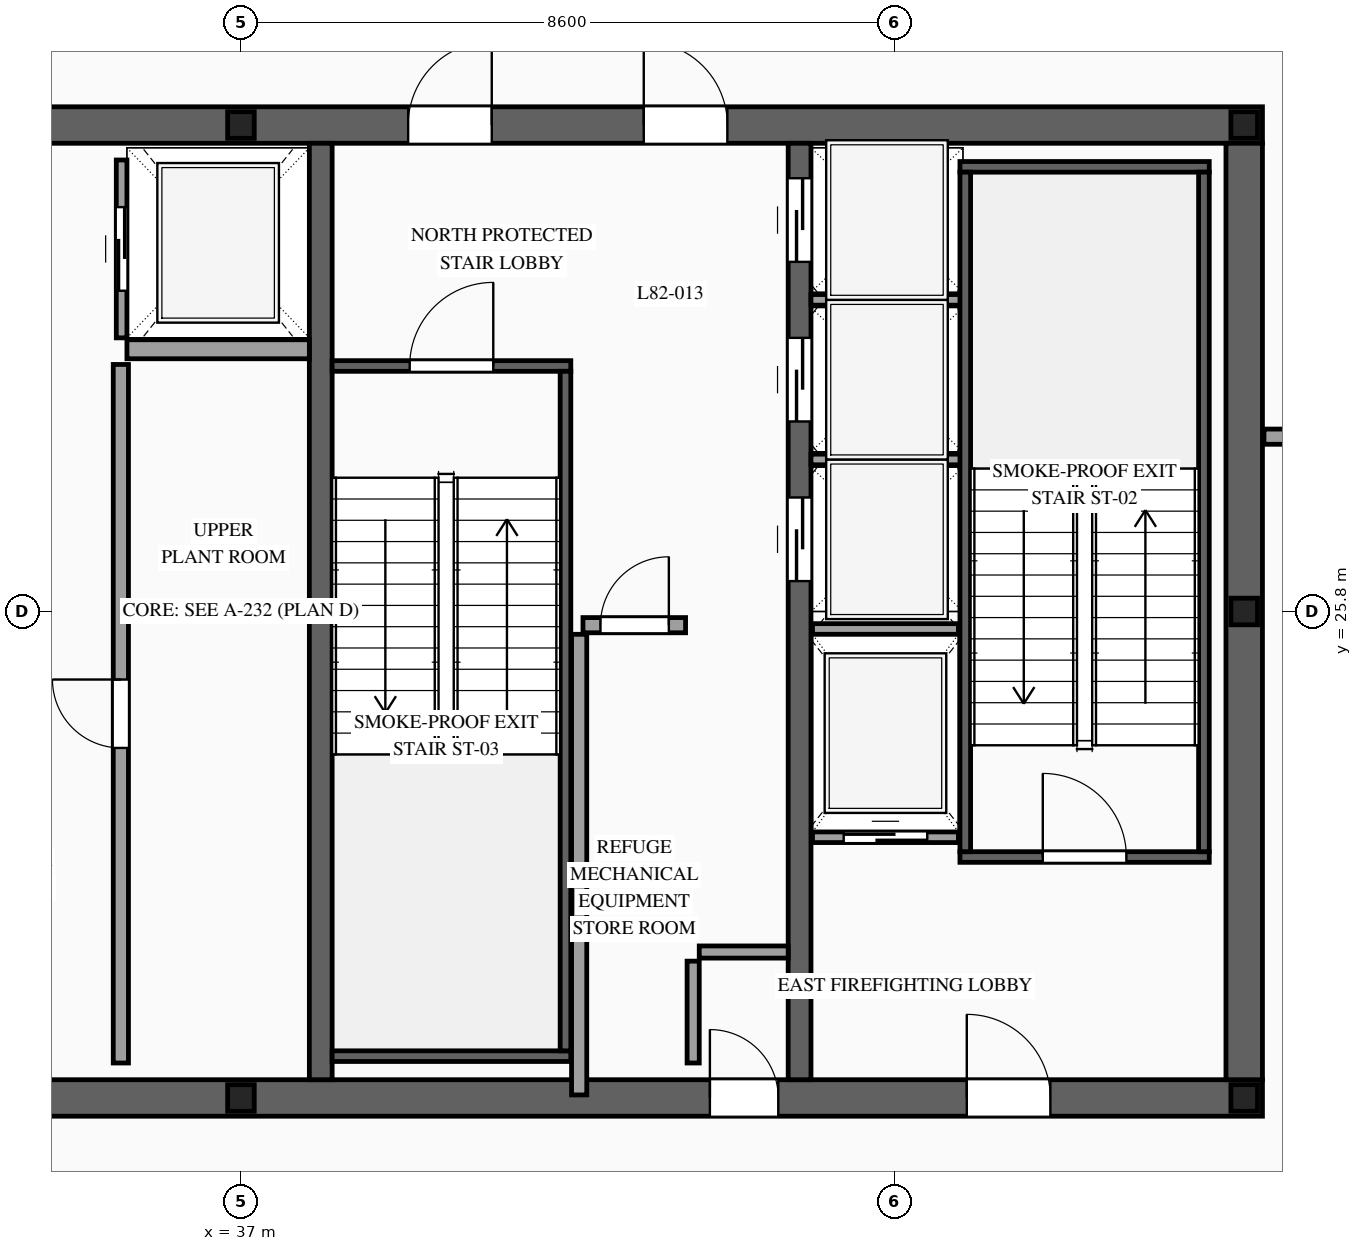
"""IFC4 building model, lengths in metres.
Left out: names, types, materials, properties, quantities, classifications, styles, units other than length and angle.
Written with IfcOpenShell. Run it as: python <this file> out.ifc"""

import sys

from ifc_helpers import new_model, si_unit, direction, frame, frame_2d, origin, origin_2d, place, context, subcontext, project, spatial, rectangle, i_section, extrude, source, transform, mapped, element, fill, save


model = new_model("IFC4")
c1 = context("Model", 3, precision=1e-05, world=origin(), true_north=direction((0.0, 1.0)))
c2 = subcontext(c1, "Body", "Model", "MODEL_VIEW")
j1 = project(units=[si_unit("LENGTHUNIT", "METRE"), si_unit("PLANEANGLEUNIT", "RADIAN")], contexts=[c1])
p1 = place(None, origin())
s1 = spatial("IfcSite", under=j1, at=p1, CompositionType="ELEMENT")
p2 = place(p1, origin())
s2 = spatial("IfcBuilding", under=s1, at=p2, CompositionType="ELEMENT")
p3 = place(p2, frame((0.0, 0.0, 306.6)))
s3 = spatial("IfcBuildingStorey", under=s2, at=p3, CompositionType="ELEMENT", Elevation=306.6)
p4 = place(p3, frame((23.56, 19.4, 0.0), z_axis=(0.0, 0.0, 1.0), x_axis=(1.0, 0.0, 0.0)))
e1 = element("IfcWall", 1, at=p4, inside=s3, PredefinedType="SHEAR", context=c2, shape_type="SweptSolid", body=[
    extrude(rectangle(XDim=26.88, YDim=0.48, at=frame_2d((13.44, 0.0))), origin(), (0.0, 0.0, 1.0), 4.6),
])
p5 = place(p4, frame((1.89, 0.0, 0.0)))
e2 = element("IfcOpeningElement", 2, at=p5, cuts=e1, PredefinedType="OPENING", context=c2, shape_type="SweptSolid", body=[
    extrude(rectangle(XDim=1.1, YDim=2.2, at=frame_2d((0.55, 1.1))), frame((0.0, 0.255, 0.0), z_axis=(0.0, -1.0, 0.0), x_axis=(1.0, 0.0, 0.0)), (0.0, 0.0, 1.0), 0.51),
])
p6 = place(p4, frame((9.79, 0.0, 0.0)))
e3 = element("IfcOpeningElement", 3, at=p6, cuts=e1, PredefinedType="OPENING", context=c2, shape_type="SweptSolid", body=[
    extrude(rectangle(XDim=1.1, YDim=2.2, at=frame_2d((0.55, 1.1))), frame((0.0, 0.255, 0.0), z_axis=(0.0, -1.0, 0.0), x_axis=(1.0, 0.0, 0.0)), (0.0, 0.0, 1.0), 0.51),
])
p7 = place(p4, frame((22.99, 0.0, 0.0)))
e4 = element("IfcOpeningElement", 4, at=p7, cuts=e1, PredefinedType="OPENING", context=c2, shape_type="SweptSolid", body=[
    extrude(rectangle(XDim=1.1, YDim=2.2, at=frame_2d((0.55, 1.1))), frame((0.0, 0.255, 0.0), z_axis=(0.0, -1.0, 0.0), x_axis=(1.0, 0.0, 0.0)), (0.0, 0.0, 1.0), 0.51),
])
p8 = place(p4, frame((19.61, 0.0, 0.0)))
e5 = element("IfcOpeningElement", 5, at=p8, cuts=e1, PredefinedType="OPENING", context=c2, shape_type="SweptSolid", body=[
    extrude(rectangle(XDim=0.9, YDim=2.15, at=frame_2d((0.45, 1.075))), frame((0.0, 0.255, 0.0), z_axis=(0.0, -1.0, 0.0), x_axis=(1.0, 0.0, 0.0)), (0.0, 0.0, 1.0), 0.51),
])
p9 = place(p3, frame((23.56, 32.2, 0.0), z_axis=(0.0, 0.0, 1.0), x_axis=(1.0, 0.0, 0.0)))
e6 = element("IfcWall", 6, at=p9, inside=s3, PredefinedType="SHEAR", context=c2, shape_type="SweptSolid", body=[
    extrude(rectangle(XDim=26.88, YDim=0.48, at=frame_2d((13.44, 0.0))), origin(), (0.0, 0.0, 1.0), 4.6),
])
p10 = place(p9, frame((4.51, 0.0, 0.0)))
e7 = element("IfcOpeningElement", 7, at=p10, cuts=e6, PredefinedType="OPENING", context=c2, shape_type="SweptSolid", body=[
    extrude(rectangle(XDim=0.9, YDim=2.15, at=frame_2d((0.45, 1.075))), frame((0.0, 0.255, 0.0), z_axis=(0.0, -1.0, 0.0), x_axis=(1.0, 0.0, 0.0)), (0.0, 0.0, 1.0), 0.51),
])
p11 = place(p9, frame((9.79, 0.0, 0.0)))
e8 = element("IfcOpeningElement", 8, at=p11, cuts=e6, PredefinedType="OPENING", context=c2, shape_type="SweptSolid", body=[
    extrude(rectangle(XDim=1.1, YDim=2.2, at=frame_2d((0.55, 1.1))), frame((0.0, 0.255, 0.0), z_axis=(0.0, -1.0, 0.0), x_axis=(1.0, 0.0, 0.0)), (0.0, 0.0, 1.0), 0.51),
])
p12 = place(p9, frame((15.64, 0.0, 0.0)))
e9 = element("IfcOpeningElement", 9, at=p12, cuts=e6, PredefinedType="OPENING", context=c2, shape_type="SweptSolid", body=[
    extrude(rectangle(XDim=1.1, YDim=2.2, at=frame_2d((0.55, 1.1))), frame((0.0, 0.255, 0.0), z_axis=(0.0, -1.0, 0.0), x_axis=(1.0, 0.0, 0.0)), (0.0, 0.0, 1.0), 0.51),
])
p13 = place(p9, frame((18.74, 0.0, 0.0)))
e10 = element("IfcOpeningElement", 10, at=p13, cuts=e6, PredefinedType="OPENING", context=c2, shape_type="SweptSolid", body=[
    extrude(rectangle(XDim=1.1, YDim=2.2, at=frame_2d((0.55, 1.1))), frame((0.0, 0.255, 0.0), z_axis=(0.0, -1.0, 0.0), x_axis=(1.0, 0.0, 0.0)), (0.0, 0.0, 1.0), 0.51),
])
m1 = source(origin(), c2, "Body", "SweptSolid", [
    extrude(rectangle(XDim=12.32, YDim=0.48, at=frame_2d((6.16, 0.0))), origin(), (0.0, 0.0, 1.0), 4.6),
])
p14 = place(p3, frame((50.2, 19.64, 0.0), z_axis=(0.0, 0.0, 1.0), x_axis=(0.0, 1.0, 0.0)))
e11 = element("IfcWall", 11, at=p14, inside=s3, PredefinedType="SHEAR", context=c2, shape_type="MappedRepresentation", body=[
    mapped(m1, transform((0.0, 0.0, 0.0), scale=1.0)),
])
m2 = source(origin(), c2, "Body", "SweptSolid", [
    extrude(rectangle(XDim=12.32, YDim=0.3, at=frame_2d((6.16, 0.0))), origin(), (0.0, 0.0, 1.0), 4.6),
])
p15 = place(p3, frame((38.05, 19.64, 0.0), z_axis=(0.0, 0.0, 1.0), x_axis=(0.0, 1.0, 0.0)))
e12 = element("IfcWall", 12, at=p15, inside=s3, PredefinedType="SOLIDWALL", context=c2, shape_type="MappedRepresentation", body=[
    mapped(m2, transform((0.0, 0.0, 0.0), scale=1.0)),
])
p16 = place(p3, frame((44.35, 19.64, 0.0), z_axis=(0.0, 0.0, 1.0), x_axis=(0.0, 1.0, 0.0)))
e13 = element("IfcWall", 13, at=p16, inside=s3, PredefinedType="SOLIDWALL", context=c2, shape_type="SweptSolid", body=[
    extrude(rectangle(XDim=12.32, YDim=0.3, at=frame_2d((6.16, 0.0))), origin(), (0.0, 0.0, 1.0), 4.6),
])
p17 = place(p16, frame((6.56, 0.0, 0.0)))
e14 = element("IfcOpeningElement", 14, at=p17, cuts=e13, PredefinedType="OPENING", context=c2, shape_type="SweptSolid", body=[
    extrude(rectangle(XDim=1.1, YDim=2.2, at=frame_2d((0.55, 1.1))), frame((0.0, 0.165, 0.0), z_axis=(0.0, -1.0, 0.0), x_axis=(1.0, 0.0, 0.0)), (0.0, 0.0, 1.0), 0.33),
])
p18 = place(p16, frame((8.66, 0.0, 0.0)))
e15 = element("IfcOpeningElement", 15, at=p18, cuts=e13, PredefinedType="OPENING", context=c2, shape_type="SweptSolid", body=[
    extrude(rectangle(XDim=1.1, YDim=2.2, at=frame_2d((0.55, 1.1))), frame((0.0, 0.165, 0.0), z_axis=(0.0, -1.0, 0.0), x_axis=(1.0, 0.0, 0.0)), (0.0, 0.0, 1.0), 0.33),
])
p19 = place(p16, frame((10.76, 0.0, 0.0)))
e16 = element("IfcOpeningElement", 16, at=p19, cuts=e13, PredefinedType="OPENING", context=c2, shape_type="SweptSolid", body=[
    extrude(rectangle(XDim=1.1, YDim=2.2, at=frame_2d((0.55, 1.1))), frame((0.0, 0.165, 0.0), z_axis=(0.0, -1.0, 0.0), x_axis=(1.0, 0.0, 0.0)), (0.0, 0.0, 1.0), 0.33),
])
m3 = source(origin(), c2, "Body", "SweptSolid", [
    extrude(i_section(OverallWidth=0.35, OverallDepth=0.35, WebThickness=0.012, FlangeThickness=0.019, at=origin_2d()), origin(), (0.0, 0.0, 1.0), 4.6),
])
for number, where, z_axis, x_axis in (
    (17, (37.0, 19.4, 0.0), (0.0, 0.0, 1.0), (1.0, 0.0, 0.0)),
    (18, (50.2, 19.4, 0.0), (0.0, 0.0, 1.0), (1.0, 0.0, 0.0)),
    (19, (50.2, 25.8, 0.0), (0.0, 0.0, 1.0), (1.0, 0.0, 0.0)),
    (20, (37.0, 32.2, 0.0), (0.0, 0.0, 1.0), (1.0, 0.0, 0.0)),
    (21, (50.2, 32.2, 0.0), (0.0, 0.0, 1.0), (1.0, 0.0, 0.0)),
):
    element("IfcColumn", number, at=place(p3, frame(where, z_axis=z_axis, x_axis=x_axis)), inside=s3, PredefinedType="COLUMN", context=c2, shape_type="MappedRepresentation", body=[
        mapped(m3, transform((0.0, 0.0, 0.0), scale=1.0)),
    ])
p20 = place(p3, frame((44.52, 22.83, 0.0), z_axis=(0.0, 0.0, 1.0), x_axis=(1.0, 0.0, 0.0)))
e22 = element("IfcWall", 22, at=p20, inside=s3, PredefinedType="SOLIDWALL", context=c2, shape_type="SweptSolid", body=[
    extrude(rectangle(XDim=1.92, YDim=0.14, at=frame_2d((0.96, 0.0))), origin(), (0.0, 0.0, 1.0), 4.38),
])
p21 = place(p20, frame((0.41, 0.0, 0.0)))
e23 = element("IfcOpeningElement", 23, at=p21, cuts=e22, PredefinedType="OPENING", context=c2, shape_type="SweptSolid", body=[
    extrude(rectangle(XDim=1.1, YDim=2.2, at=frame_2d((0.55, 1.1))), frame((0.0, 0.085, 0.0), z_axis=(0.0, -1.0, 0.0), x_axis=(1.0, 0.0, 0.0)), (0.0, 0.0, 1.0), 0.17),
])
m4 = source(origin(), c2, "Body", "SweptSolid", [
    extrude(rectangle(XDim=1.92, YDim=0.14, at=frame_2d((0.96, 0.0))), origin(), (0.0, 0.0, 1.0), 4.38),
])
p22 = place(p3, frame((44.52, 25.57, 0.0), z_axis=(0.0, 0.0, 1.0), x_axis=(1.0, 0.0, 0.0)))
e24 = element("IfcWall", 24, at=p22, inside=s3, PredefinedType="SOLIDWALL", context=c2, shape_type="MappedRepresentation", body=[
    mapped(m4, transform((0.0, 0.0, 0.0), scale=1.0)),
])
p23 = place(p3, frame((35.43, 29.4, 0.0), z_axis=(0.0, 0.0, 1.0), x_axis=(0.0, 1.0, 0.0)))
e25 = element("IfcWall", 25, at=p23, inside=s3, PredefinedType="SOLIDWALL", context=c2, shape_type="SweptSolid", body=[
    extrude(rectangle(XDim=2.34, YDim=0.14, at=frame_2d((1.17, 0.0))), origin(), (0.0, 0.0, 1.0), 4.38),
])
p24 = place(p23, frame((0.62, 0.0, 0.0)))
e26 = element("IfcOpeningElement", 26, at=p24, cuts=e25, PredefinedType="OPENING", context=c2, shape_type="SweptSolid", body=[
    extrude(rectangle(XDim=1.1, YDim=2.2, at=frame_2d((0.55, 1.1))), frame((0.0, 0.085, 0.0), z_axis=(0.0, -1.0, 0.0), x_axis=(1.0, 0.0, 0.0)), (0.0, 0.0, 1.0), 0.17),
])
m5 = source(origin(), c2, "Body", "SweptSolid", [
    extrude(rectangle(XDim=2.4, YDim=0.25, at=frame_2d((1.2, 0.0))), origin(), (0.0, 0.0, 1.0), 4.38),
])
p25 = place(p3, frame((35.5, 29.25, 0.0), z_axis=(0.0, 0.0, 1.0), x_axis=(1.0, 0.0, 0.0)))
e27 = element("IfcWall", 27, at=p25, inside=s3, PredefinedType="SOLIDWALL", context=c2, shape_type="MappedRepresentation", body=[
    mapped(m5, transform((0.0, 0.0, 0.0), scale=1.0)),
])
m6 = source(origin(), c2, "Body", "SweptSolid", [
    extrude(rectangle(XDim=2.0, YDim=0.14, at=frame_2d((1.0, 0.0))), origin(), (0.0, 0.0, 1.0), 4.38),
])
for number, where, z_axis, x_axis in (
    (28, (44.5, 27.8, 0.0), (0.0, 0.0, 1.0), (1.0, 0.0, 0.0)),
    (29, (44.5, 29.9, 0.0), (0.0, 0.0, 1.0), (1.0, 0.0, 0.0)),
):
    element("IfcWall", number, at=place(p3, frame(where, z_axis=z_axis, x_axis=x_axis)), inside=s3, PredefinedType="SOLIDWALL", context=c2, shape_type="MappedRepresentation", body=[
        mapped(m6, transform((0.0, 0.0, 0.0), scale=1.0)),
    ])
p26 = place(p3, frame((46.46, 22.57, 0.0), z_axis=(0.0, 0.0, 1.0), x_axis=(1.0, 0.0, 0.0)))
e30 = element("IfcWall", 30, at=p26, inside=s3, PredefinedType="SOLIDWALL", context=c2, shape_type="SweptSolid", body=[
    extrude(rectangle(XDim=3.28, YDim=0.14, at=frame_2d((1.64, 0.0))), origin(), (0.0, 0.0, 1.0), 4.38),
])
p27 = place(p26, frame((1.09, 0.0, 0.0)))
e31 = element("IfcOpeningElement", 31, at=p27, cuts=e30, PredefinedType="OPENING", context=c2, shape_type="SweptSolid", body=[
    extrude(rectangle(XDim=1.1, YDim=2.2, at=frame_2d((0.55, 1.1))), frame((0.0, 0.085, 0.0), z_axis=(0.0, -1.0, 0.0), x_axis=(1.0, 0.0, 0.0)), (0.0, 0.0, 1.0), 0.17),
])
m7 = source(origin(), c2, "Body", "SweptSolid", [
    extrude(rectangle(XDim=3.28, YDim=0.14, at=frame_2d((1.64, 0.0))), origin(), (0.0, 0.0, 1.0), 4.38),
])
p28 = place(p3, frame((46.46, 31.65, 0.0), z_axis=(0.0, 0.0, 1.0), x_axis=(1.0, 0.0, 0.0)))
e32 = element("IfcWall", 32, at=p28, inside=s3, PredefinedType="SOLIDWALL", context=c2, shape_type="MappedRepresentation", body=[
    mapped(m7, transform((0.0, 0.0, 0.0), scale=1.0)),
])
m8 = source(origin(), c2, "Body", "SweptSolid", [
    extrude(rectangle(XDim=8.94, YDim=0.14, at=frame_2d((4.47, 0.0))), origin(), (0.0, 0.0, 1.0), 4.38),
])
for number, where, z_axis, x_axis in (
    (33, (46.53, 22.64, 0.0), (0.0, 0.0, 1.0), (0.0, 1.0, 0.0)),
    (34, (49.67, 22.64, 0.0), (0.0, 0.0, 1.0), (0.0, 1.0, 0.0)),
):
    element("IfcWall", number, at=place(p3, frame(where, z_axis=z_axis, x_axis=x_axis)), inside=s3, PredefinedType="SOLIDWALL", context=c2, shape_type="MappedRepresentation", body=[
        mapped(m8, transform((0.0, 0.0, 0.0), scale=1.0)),
    ])
p29 = place(p3, frame((38.2, 29.03, 0.0), z_axis=(0.0, 0.0, 1.0), x_axis=(1.0, 0.0, 0.0)))
e35 = element("IfcWall", 35, at=p29, inside=s3, PredefinedType="SOLIDWALL", context=c2, shape_type="SweptSolid", body=[
    extrude(rectangle(XDim=3.14, YDim=0.14, at=frame_2d((1.57, 0.0))), origin(), (0.0, 0.0, 1.0), 4.38),
])
p30 = place(p29, frame((1.02, 0.0, 0.0)))
e36 = element("IfcOpeningElement", 36, at=p30, cuts=e35, PredefinedType="OPENING", context=c2, shape_type="SweptSolid", body=[
    extrude(rectangle(XDim=1.1, YDim=2.2, at=frame_2d((0.55, 1.1))), frame((0.0, 0.085, 0.0), z_axis=(0.0, -1.0, 0.0), x_axis=(1.0, 0.0, 0.0)), (0.0, 0.0, 1.0), 0.17),
])
m9 = source(origin(), c2, "Body", "SweptSolid", [
    extrude(rectangle(XDim=3.14, YDim=0.14, at=frame_2d((1.57, 0.0))), origin(), (0.0, 0.0, 1.0), 4.38),
])
p31 = place(p3, frame((38.2, 19.95, 0.0), z_axis=(0.0, 0.0, 1.0), x_axis=(1.0, 0.0, 0.0)))
e37 = element("IfcWall", 37, at=p31, inside=s3, PredefinedType="SOLIDWALL", context=c2, shape_type="MappedRepresentation", body=[
    mapped(m9, transform((0.0, 0.0, 0.0), scale=1.0)),
])
m10 = source(origin(), c2, "Body", "SweptSolid", [
    extrude(rectangle(XDim=8.94, YDim=0.14, at=frame_2d((4.47, 0.0))), origin(), (0.0, 0.0, 1.0), 4.38),
])
p32 = place(p3, frame((41.27, 20.02, 0.0), z_axis=(0.0, 0.0, 1.0), x_axis=(0.0, 1.0, 0.0)))
e38 = element("IfcWall", 38, at=p32, inside=s3, PredefinedType="SOLIDWALL", context=c2, shape_type="MappedRepresentation", body=[
    mapped(m10, transform((0.0, 0.0, 0.0), scale=1.0)),
])
p33 = place(p3, frame((35.42, 19.86, 0.0), z_axis=(0.0, 0.0, 1.0), x_axis=(0.0, 1.0, 0.0)))
e39 = element("IfcWall", 39, at=p33, inside=s3, PredefinedType="PARTITIONING", context=c2, shape_type="SweptSolid", body=[
    extrude(rectangle(XDim=9.19, YDim=0.2, at=frame_2d((4.595, 0.0))), origin(), (0.0, 0.0, 1.0), 4.38),
])
p34 = place(p33, frame((4.145, 0.0, 0.0)))
e40 = element("IfcOpeningElement", 40, at=p34, cuts=e39, PredefinedType="OPENING", context=c2, shape_type="SweptSolid", body=[
    extrude(rectangle(XDim=0.9, YDim=2.15, at=frame_2d((0.45, 1.075))), frame((0.0, 0.115, 0.0), z_axis=(0.0, -1.0, 0.0), x_axis=(1.0, 0.0, 0.0)), (0.0, 0.0, 1.0), 0.23),
])
m11 = source(origin(), c2, "Body", "SweptSolid", [
    extrude(rectangle(XDim=1.34, YDim=0.16, at=frame_2d((0.67, 0.0))), origin(), (0.0, 0.0, 1.0), 4.38),
])
p35 = place(p3, frame((42.95, 19.86, 0.0), z_axis=(0.0, 0.0, 1.0), x_axis=(0.0, 1.0, 0.0)))
e41 = element("IfcWall", 41, at=p35, inside=s3, PredefinedType="PARTITIONING", context=c2, shape_type="MappedRepresentation", body=[
    mapped(m11, transform((0.0, 0.0, 0.0), scale=1.0)),
])
m12 = source(origin(), c2, "Body", "SweptSolid", [
    extrude(rectangle(XDim=1.17, YDim=0.16, at=frame_2d((0.585, 0.0))), origin(), (0.0, 0.0, 1.0), 4.38),
])
p36 = place(p3, frame((43.03, 21.32, 0.0), z_axis=(0.0, 0.0, 1.0), x_axis=(1.0, 0.0, 0.0)))
e42 = element("IfcWall", 42, at=p36, inside=s3, PredefinedType="PARTITIONING", context=c2, shape_type="MappedRepresentation", body=[
    mapped(m12, transform((0.0, 0.0, 0.0), scale=1.0)),
])
m13 = source(origin(), c2, "Body", "SweptSolid", [
    extrude(rectangle(XDim=6.06, YDim=0.2, at=frame_2d((3.03, 0.0))), origin(), (0.0, 0.0, 1.0), 4.38),
])
p37 = place(p3, frame((41.45, 19.44, 0.0), z_axis=(0.0, 0.0, 1.0), x_axis=(0.0, 1.0, 0.0)))
e43 = element("IfcWall", 43, at=p37, inside=s3, PredefinedType="PARTITIONING", context=c2, shape_type="MappedRepresentation", body=[
    mapped(m13, transform((0.0, 0.0, 0.0), scale=1.0)),
])
p38 = place(p3, frame((41.5, 25.62, 0.0), z_axis=(0.0, 0.0, 1.0), x_axis=(1.0, 0.0, 0.0)))
e44 = element("IfcWall", 44, at=p38, inside=s3, PredefinedType="PARTITIONING", context=c2, shape_type="SweptSolid", body=[
    extrude(rectangle(XDim=1.35, YDim=0.2, at=frame_2d((0.675, 0.0))), origin(), (0.0, 0.0, 1.0), 4.38),
])
p39 = place(p38, frame((0.23, 0.0, 0.0)))
e45 = element("IfcOpeningElement", 45, at=p39, cuts=e44, PredefinedType="OPENING", context=c2, shape_type="SweptSolid", body=[
    extrude(rectangle(XDim=0.9, YDim=2.15, at=frame_2d((0.45, 1.075))), frame((0.0, 0.115, 0.0), z_axis=(0.0, -1.0, 0.0), x_axis=(1.0, 0.0, 0.0)), (0.0, 0.0, 1.0), 0.23),
])
m14 = source(origin(), c2, "Body", "SweptSolid", [
    extrude(rectangle(XDim=1.59, YDim=0.2, at=frame_2d((0.795, 0.0))), origin(), (0.0, 0.0, 1.0), 4.38),
])
p40 = place(p3, frame((50.46, 28.1, 0.0), z_axis=(0.0, 0.0, 1.0), x_axis=(1.0, 0.0, 0.0)))
e46 = element("IfcWall", 46, at=p40, inside=s3, PredefinedType="PARTITIONING", context=c2, shape_type="MappedRepresentation", body=[
    mapped(m14, transform((0.0, 0.0, 0.0), scale=1.0)),
])
m15 = source(origin(), c2, "Body", "SweptSolid", [
    extrude(rectangle(XDim=1.1, YDim=2.2, at=frame_2d((0.55, 1.1))), frame((0.0, 0.025, 0.0), z_axis=(0.0, -1.0, 0.0), x_axis=(1.0, 0.0, 0.0)), (0.0, 0.0, 1.0), 0.05),
])
p41 = place(p21, origin())
e47 = element("IfcDoor", 47, at=p41, inside=s3, OperationType="SLIDING_TO_RIGHT", PredefinedType="DOOR", context=c2, shape_type="MappedRepresentation", body=[
    mapped(m15, transform((0.0, 0.0, 0.0), scale=1.0)),
])
fill(e23, e47)
p42 = place(p24, origin())
e48 = element("IfcDoor", 48, at=p42, inside=s3, OperationType="SLIDING_TO_RIGHT", PredefinedType="DOOR", context=c2, shape_type="MappedRepresentation", body=[
    mapped(m15, transform((0.0, 0.0, 0.0), scale=1.0)),
])
fill(e26, e48)
p43 = place(p17, origin())
e49 = element("IfcDoor", 49, at=p43, inside=s3, OperationType="SLIDING_TO_LEFT", PredefinedType="DOOR", context=c2, shape_type="MappedRepresentation", body=[
    mapped(m15, transform((0.0, 0.0, 0.0), scale=1.0)),
])
fill(e14, e49)
p44 = place(p18, origin())
e50 = element("IfcDoor", 50, at=p44, inside=s3, OperationType="SLIDING_TO_RIGHT", PredefinedType="DOOR", context=c2, shape_type="MappedRepresentation", body=[
    mapped(m15, transform((0.0, 0.0, 0.0), scale=1.0)),
])
fill(e15, e50)
p45 = place(p19, origin())
e51 = element("IfcDoor", 51, at=p45, inside=s3, OperationType="SLIDING_TO_LEFT", PredefinedType="DOOR", context=c2, shape_type="MappedRepresentation", body=[
    mapped(m15, transform((0.0, 0.0, 0.0), scale=1.0)),
])
fill(e16, e51)
m16 = source(origin(), c2, "Body", "SweptSolid", [
    extrude(rectangle(XDim=1.1, YDim=2.2, at=frame_2d((0.55, 1.1))), frame((0.0, 0.025, 0.0), z_axis=(0.0, -1.0, 0.0), x_axis=(1.0, 0.0, 0.0)), (0.0, 0.0, 1.0), 0.05),
])
p46 = place(p27, origin())
e52 = element("IfcDoor", 52, at=p46, inside=s3, OperationType="SINGLE_SWING_LEFT", PredefinedType="DOOR", context=c2, shape_type="MappedRepresentation", body=[
    mapped(m16, transform((0.0, 0.0, 0.0), scale=1.0)),
])
fill(e31, e52)
p47 = place(p30, origin())
e53 = element("IfcDoor", 53, at=p47, inside=s3, OperationType="SINGLE_SWING_RIGHT", PredefinedType="DOOR", context=c2, shape_type="MappedRepresentation", body=[
    mapped(m16, transform((0.0, 0.0, 0.0), scale=1.0)),
])
fill(e36, e53)
p48 = place(p7, origin())
e54 = element("IfcDoor", 54, at=p48, inside=s3, OperationType="SINGLE_SWING_LEFT", PredefinedType="DOOR", context=c2, shape_type="MappedRepresentation", body=[
    mapped(m16, transform((0.0, 0.0, 0.0), scale=1.0)),
])
fill(e4, e54)
p49 = place(p12, origin())
e55 = element("IfcDoor", 55, at=p49, inside=s3, OperationType="SINGLE_SWING_RIGHT", PredefinedType="DOOR", context=c2, shape_type="MappedRepresentation", body=[
    mapped(m16, transform((0.0, 0.0, 0.0), scale=1.0)),
])
fill(e9, e55)
p50 = place(p13, origin())
e56 = element("IfcDoor", 56, at=p50, inside=s3, OperationType="SINGLE_SWING_LEFT", PredefinedType="DOOR", context=c2, shape_type="MappedRepresentation", body=[
    mapped(m16, transform((0.0, 0.0, 0.0), scale=1.0)),
])
fill(e10, e56)
m17 = source(origin(), c2, "Body", "SweptSolid", [
    extrude(rectangle(XDim=0.9, YDim=2.15, at=frame_2d((0.45, 1.075))), frame((0.0, 0.025, 0.0), z_axis=(0.0, -1.0, 0.0), x_axis=(1.0, 0.0, 0.0)), (0.0, 0.0, 1.0), 0.05),
])
p51 = place(p34, origin())
e57 = element("IfcDoor", 57, at=p51, inside=s3, OperationType="SINGLE_SWING_RIGHT", PredefinedType="DOOR", context=c2, shape_type="MappedRepresentation", body=[
    mapped(m17, transform((0.0, 0.0, 0.0), scale=1.0)),
])
fill(e40, e57)
p52 = place(p8, origin())
e58 = element("IfcDoor", 58, at=p52, inside=s3, OperationType="SINGLE_SWING_LEFT", PredefinedType="DOOR", context=c2, shape_type="MappedRepresentation", body=[
    mapped(m17, transform((0.0, 0.0, 0.0), scale=1.0)),
])
fill(e5, e58)
p53 = place(p39, origin())
e59 = element("IfcDoor", 59, at=p53, inside=s3, OperationType="SINGLE_SWING_RIGHT", PredefinedType="DOOR", context=c2, shape_type="MappedRepresentation", body=[
    mapped(m17, transform((0.0, 0.0, 0.0), scale=1.0)),
])
fill(e45, e59)
save(model, sys.argv[1])
